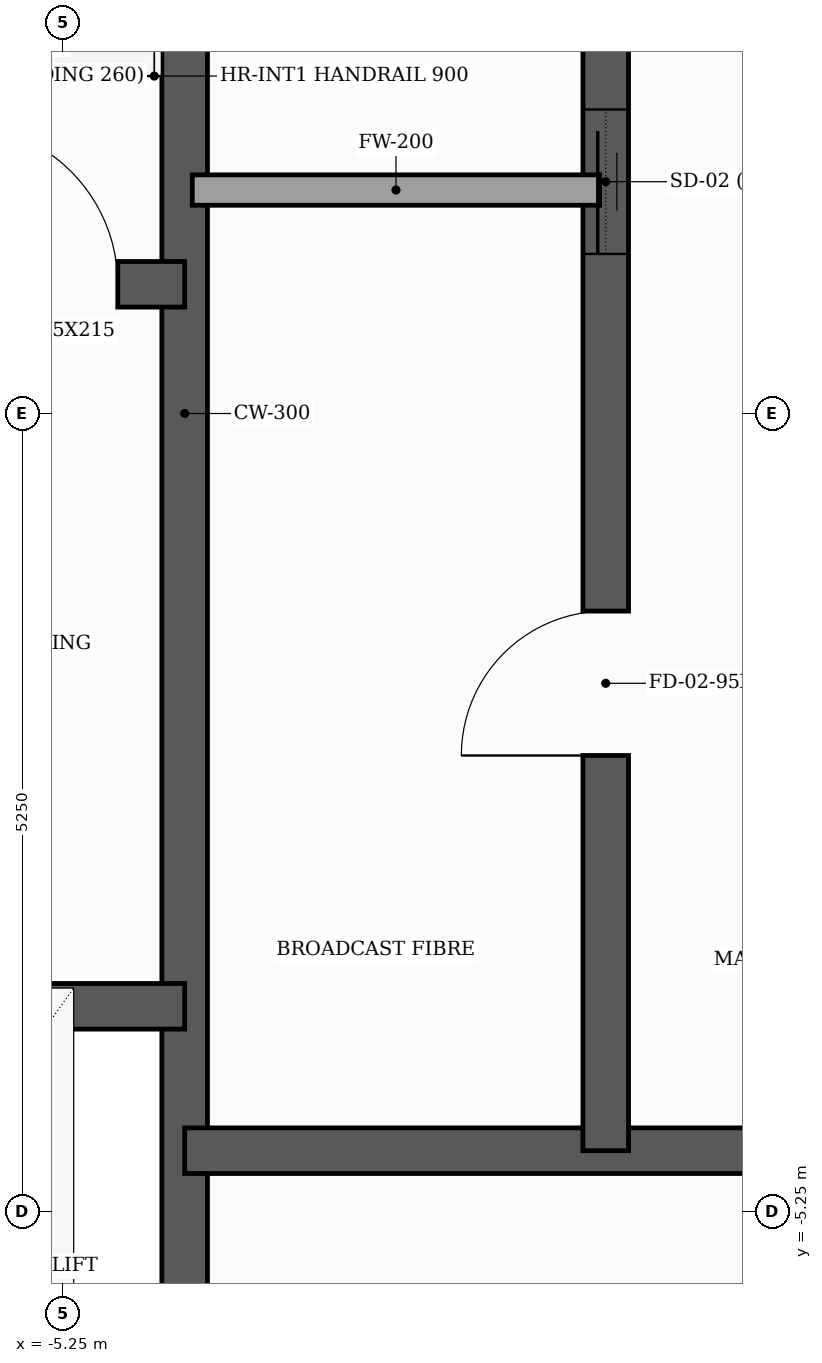
"""IFC4 building model, lengths in metres.
Left out: names, types, materials, properties, quantities, classifications, styles, units other than length and angle.
Written with IfcOpenShell. Run it as: python <this file> out.ifc"""

import sys

from ifc_helpers import new_model, si_unit, direction, frame, frame_2d, origin, place, context, subcontext, project, spatial, rectangle, extrude, element, fill, save


model = new_model("IFC4")
c1 = context("Model", 3, precision=1e-05, world=origin(), true_north=direction((0.0, 1.0)))
c2 = subcontext(c1, "Body", "Model", "MODEL_VIEW")
j1 = project(units=[si_unit("LENGTHUNIT", "METRE"), si_unit("PLANEANGLEUNIT", "RADIAN")], contexts=[c1])
p1 = place(None, origin())
s1 = spatial("IfcSite", under=j1, at=p1, CompositionType="ELEMENT")
p2 = place(p1, origin())
s2 = spatial("IfcBuilding", under=s1, at=p2, CompositionType="ELEMENT")
p3 = place(p2, frame((0.0, 0.0, 184.2)))
s3 = spatial("IfcBuildingStorey", under=s2, at=p3, CompositionType="ELEMENT", Elevation=184.2)
p4 = place(p3, frame((-4.45, -7.79, 0.0), z_axis=(0.0, 0.0, 1.0), x_axis=(0.0, 1.0, 0.0)))
e1 = element("IfcWall", 1, at=p4, inside=s3, PredefinedType="SHEAR", context=c2, shape_type="SweptSolid", body=[
    extrude(rectangle(XDim=15.58, YDim=0.3, at=frame_2d((7.79, 0.0))), origin(), (0.0, 0.0, 1.0), 3.5),
])
p5 = place(p3, frame((-7.79, 0.85, 0.0), z_axis=(0.0, 0.0, 1.0), x_axis=(1.0, 0.0, 0.0)))
e2 = element("IfcWall", 2, at=p5, inside=s3, PredefinedType="SHEAR", context=c2, shape_type="SweptSolid", body=[
    extrude(rectangle(XDim=3.34, YDim=0.3, at=frame_2d((1.67, 0.0))), origin(), (0.0, 0.0, 1.0), 3.5),
])
p6 = place(p5, frame((1.85, 0.0, 0.0)))
e3 = element("IfcOpeningElement", 3, at=p6, cuts=e2, PredefinedType="OPENING", context=c2, shape_type="SweptSolid", body=[
    extrude(rectangle(XDim=1.05, YDim=2.15, at=frame_2d((0.525, 1.075))), frame((0.0, 0.16, 0.0), z_axis=(0.0, -1.0, 0.0), x_axis=(1.0, 0.0, 0.0)), (0.0, 0.0, 1.0), 0.32),
])
p7 = place(p3, frame((-7.79, -3.9, 0.0), z_axis=(0.0, 0.0, 1.0), x_axis=(1.0, 0.0, 0.0)))
e4 = element("IfcWall", 4, at=p7, inside=s3, PredefinedType="SHEAR", context=c2, shape_type="SweptSolid", body=[
    extrude(rectangle(XDim=3.34, YDim=0.3, at=frame_2d((1.67, 0.0))), origin(), (0.0, 0.0, 1.0), 3.5),
])
p8 = place(p7, frame((1.27, 0.0, 0.0)))
e5 = element("IfcOpeningElement", 5, at=p8, cuts=e4, PredefinedType="OPENING", context=c2, shape_type="SweptSolid", body=[
    extrude(rectangle(XDim=1.1, YDim=2.1, at=frame_2d((0.55, 1.05))), frame((0.0, 0.16, 0.0), z_axis=(0.0, -1.0, 0.0), x_axis=(1.0, 0.0, 0.0)), (0.0, 0.0, 1.0), 0.32),
])
p9 = place(p3, frame((-4.45, -4.85, 0.0), z_axis=(0.0, 0.0, 1.0), x_axis=(1.0, 0.0, 0.0)))
e6 = element("IfcWall", 6, at=p9, inside=s3, PredefinedType="SHEAR", context=c2, shape_type="SweptSolid", body=[
    extrude(rectangle(XDim=8.9, YDim=0.3, at=frame_2d((4.45, 0.0))), origin(), (0.0, 0.0, 1.0), 3.5),
])
p10 = place(p3, frame((-1.68, -4.85, 0.0), z_axis=(0.0, 0.0, 1.0), x_axis=(0.0, 1.0, 0.0)))
e7 = element("IfcWall", 7, at=p10, inside=s3, PredefinedType="SHEAR", context=c2, shape_type="SweptSolid", body=[
    extrude(rectangle(XDim=12.64, YDim=0.3, at=frame_2d((6.32, 0.0))), origin(), (0.0, 0.0, 1.0), 3.5),
])
p11 = place(p10, frame((2.6, 0.0, 0.0)))
e8 = element("IfcOpeningElement", 8, at=p11, cuts=e7, PredefinedType="OPENING", context=c2, shape_type="SweptSolid", body=[
    extrude(rectangle(XDim=0.95, YDim=2.1, at=frame_2d((0.475, 1.05))), frame((0.0, 0.16, 0.0), z_axis=(0.0, -1.0, 0.0), x_axis=(1.0, 0.0, 0.0)), (0.0, 0.0, 1.0), 0.32),
])
p12 = place(p10, frame((8.8, 0.0, 0.0)))
e9 = element("IfcOpeningElement", 9, at=p12, cuts=e7, PredefinedType="OPENING", context=c2, shape_type="SweptSolid", body=[
    extrude(rectangle(XDim=0.95, YDim=2.1, at=frame_2d((0.475, 1.05))), frame((0.0, 0.16, 0.0), z_axis=(0.0, -1.0, 0.0), x_axis=(1.0, 0.0, 0.0)), (0.0, 0.0, 1.0), 0.32),
])
p13 = place(p3, frame((-4.4, 1.47, 0.0), z_axis=(0.0, 0.0, 1.0), x_axis=(1.0, 0.0, 0.0)))
e10 = element("IfcWall", 10, at=p13, inside=s3, PredefinedType="SOLIDWALL", context=c2, shape_type="SweptSolid", body=[
    extrude(rectangle(XDim=2.68, YDim=0.2, at=frame_2d((1.34, 0.0))), origin(), (0.0, 0.0, 1.0), 3.5),
])
p14 = place(p6, origin())
e11 = element("IfcDoor", 11, at=p14, inside=s3, OperationType="SINGLE_SWING_LEFT", PredefinedType="DOOR", context=c2, shape_type="SweptSolid", body=[
    extrude(rectangle(XDim=1.05, YDim=2.15, at=frame_2d((0.525, 1.075))), frame((0.0, 0.025, 0.0), z_axis=(0.0, -1.0, 0.0), x_axis=(1.0, 0.0, 0.0)), (0.0, 0.0, 1.0), 0.05),
])
fill(e3, e11)
p15 = place(p11, origin())
e12 = element("IfcDoor", 12, at=p15, inside=s3, OperationType="SINGLE_SWING_LEFT", PredefinedType="DOOR", context=c2, shape_type="SweptSolid", body=[
    extrude(rectangle(XDim=0.95, YDim=2.1, at=frame_2d((0.475, 1.05))), frame((0.0, 0.025, 0.0), z_axis=(0.0, -1.0, 0.0), x_axis=(1.0, 0.0, 0.0)), (0.0, 0.0, 1.0), 0.05),
])
fill(e8, e12)
save(model, sys.argv[1])
